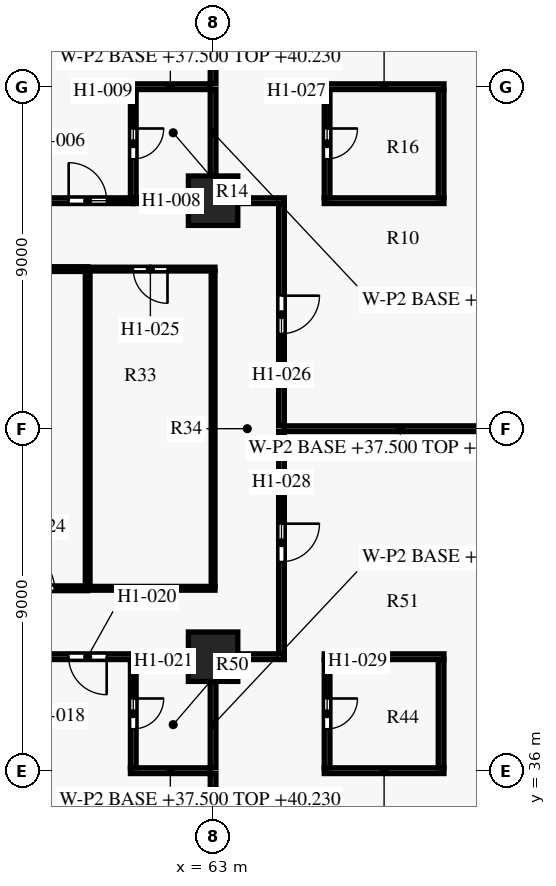
"""IFC4 building model, lengths in metres.
Left out: names, types, materials, properties, quantities, classifications, styles, units other than length and angle.
Written with IfcOpenShell. Run it as: python <this file> out.ifc"""

import sys

from ifc_helpers import new_model, si_unit, direction, frame, frame_2d, origin, origin_2d, place, context, subcontext, project, spatial, rectangle, extrude, element, fill, save


model = new_model("IFC4")
c1 = context("Model", 3, precision=1e-05, world=origin(), true_north=direction((0.0, 1.0)))
c2 = subcontext(c1, "Body", "Model", "MODEL_VIEW")
j1 = project(units=[si_unit("LENGTHUNIT", "METRE"), si_unit("PLANEANGLEUNIT", "RADIAN")], contexts=[c1])
p1 = place(None, origin())
s1 = spatial("IfcSite", under=j1, at=p1, CompositionType="ELEMENT")
p2 = place(p1, origin())
s2 = spatial("IfcBuilding", under=s1, at=p2, CompositionType="ELEMENT")
p3 = place(p2, frame((0.0, 0.0, 37.5)))
s3 = spatial("IfcBuildingStorey", under=s2, at=p3, CompositionType="ELEMENT", Elevation=37.5)
for number, where, z_axis, x_axis in (
    (1, (63.0, 39.0, 0.0), (0.0, 0.0, 1.0), (1.0, 0.0, 0.0)),
    (2, (63.0, 51.0, 0.0), (0.0, 0.0, 1.0), (1.0, 0.0, 0.0)),
):
    element("IfcColumn", number, at=place(p3, frame(where, z_axis=z_axis, x_axis=x_axis)), inside=s3, PredefinedType="COLUMN", context=c2, shape_type="SweptSolid", body=[
        extrude(rectangle(XDim=1.3, YDim=1.3, at=origin_2d()), origin(), (0.0, 0.0, 1.0), 3.6),
    ])
p4 = place(p3, frame((63.0, 35.925, 0.0), z_axis=(0.0, 0.0, 1.0), x_axis=(0.0, -1.0, 0.0)))
e3 = element("IfcWall", 3, at=p4, inside=s3, PredefinedType="PARTITIONING", context=c2, shape_type="SweptSolid", body=[
    extrude(rectangle(XDim=8.8, YDim=0.15, at=frame_2d((4.4, 0.0))), origin(), (0.0, 0.0, 1.0), 2.73),
])
p5 = place(p3, frame((60.825, 36.0, 0.0), z_axis=(0.0, 0.0, 1.0), x_axis=(1.0, 0.0, 0.0)))
e4 = element("IfcWall", 4, at=p5, inside=s3, PredefinedType="PARTITIONING", context=c2, shape_type="SweptSolid", body=[
    extrude(rectangle(XDim=2.1, YDim=0.15, at=frame_2d((1.05, 0.0))), origin(), (0.0, 0.0, 1.0), 2.73),
])
p6 = place(p3, frame((65.925, 36.0, 0.0), z_axis=(0.0, 0.0, 1.0), x_axis=(1.0, 0.0, 0.0)))
e5 = element("IfcWall", 5, at=p6, inside=s3, PredefinedType="PARTITIONING", context=c2, shape_type="SweptSolid", body=[
    extrude(rectangle(XDim=3.15, YDim=0.15, at=frame_2d((1.575, 0.0))), origin(), (0.0, 0.0, 1.0), 3.28),
])
p7 = place(p3, frame((69.0, 36.075, 0.0), z_axis=(0.0, 0.0, 1.0), x_axis=(0.0, 1.0, 0.0)))
e6 = element("IfcWall", 6, at=p7, inside=s3, PredefinedType="PARTITIONING", context=c2, shape_type="SweptSolid", body=[
    extrude(rectangle(XDim=2.85, YDim=0.15, at=frame_2d((1.425, 0.0))), origin(), (0.0, 0.0, 1.0), 2.58),
])
p8 = place(p3, frame((63.0, 38.345, 0.0), z_axis=(0.0, 0.0, 1.0), x_axis=(0.0, -1.0, 0.0)))
e7 = element("IfcWall", 7, at=p8, inside=s3, PredefinedType="PARTITIONING", context=c2, shape_type="SweptSolid", body=[
    extrude(rectangle(XDim=2.27, YDim=0.15, at=frame_2d((1.135, 0.0))), origin(), (0.0, 0.0, 1.0), 2.73),
])
p9 = place(p3, frame((60.9, 38.925, 0.0), z_axis=(0.0, 0.0, 1.0), x_axis=(0.0, -1.0, 0.0)))
e8 = element("IfcWall", 8, at=p9, inside=s3, PredefinedType="PARTITIONING", context=c2, shape_type="SweptSolid", body=[
    extrude(rectangle(XDim=2.85, YDim=0.15, at=frame_2d((1.425, 0.0))), origin(), (0.0, 0.0, 1.0), 2.58),
])
p10 = place(p9, frame((1.025, 0.0, 0.0)))
e9 = element("IfcOpeningElement", 9, at=p10, cuts=e8, PredefinedType="OPENING", context=c2, shape_type="SweptSolid", body=[
    extrude(rectangle(XDim=0.8, YDim=2.1, at=frame_2d((0.4, 1.05))), frame((0.0, 0.085, 0.0), z_axis=(0.0, -1.0, 0.0), x_axis=(1.0, 0.0, 0.0)), (0.0, 0.0, 1.0), 0.17),
])
p11 = place(p3, frame((66.0, 38.925, 0.0), z_axis=(0.0, 0.0, 1.0), x_axis=(0.0, -1.0, 0.0)))
e10 = element("IfcWall", 10, at=p11, inside=s3, PredefinedType="PARTITIONING", context=c2, shape_type="SweptSolid", body=[
    extrude(rectangle(XDim=2.85, YDim=0.15, at=frame_2d((1.425, 0.0))), origin(), (0.0, 0.0, 1.0), 2.58),
])
p12 = place(p11, frame((1.025, 0.0, 0.0)))
e11 = element("IfcOpeningElement", 11, at=p12, cuts=e10, PredefinedType="OPENING", context=c2, shape_type="SweptSolid", body=[
    extrude(rectangle(XDim=0.8, YDim=2.1, at=frame_2d((0.4, 1.05))), frame((0.0, 0.085, 0.0), z_axis=(0.0, -1.0, 0.0), x_axis=(1.0, 0.0, 0.0)), (0.0, 0.0, 1.0), 0.17),
])
p13 = place(p3, frame((60.9, 39.0, 0.0), z_axis=(0.0, 0.0, 1.0), x_axis=(-1.0, 0.0, 0.0)))
e12 = element("IfcWall", 12, at=p13, inside=s3, PredefinedType="PARTITIONING", context=c2, shape_type="SweptSolid", body=[
    extrude(rectangle(XDim=2.4, YDim=0.15, at=frame_2d((1.2, 0.0))), origin(), (0.0, 0.0, 1.0), 2.58),
])
p14 = place(p13, frame((0.7, 0.0, 0.0)))
e13 = element("IfcOpeningElement", 13, at=p14, cuts=e12, PredefinedType="OPENING", context=c2, shape_type="SweptSolid", body=[
    extrude(rectangle(XDim=1.0, YDim=2.1, at=frame_2d((0.5, 1.05))), frame((0.0, 0.085, 0.0), z_axis=(0.0, -1.0, 0.0), x_axis=(1.0, 0.0, 0.0)), (0.0, 0.0, 1.0), 0.17),
])
p15 = place(p3, frame((62.345, 39.0, 0.0), z_axis=(0.0, 0.0, 1.0), x_axis=(-1.0, 0.0, 0.0)))
e14 = element("IfcWall", 14, at=p15, inside=s3, PredefinedType="PARTITIONING", context=c2, shape_type="SweptSolid", body=[
    extrude(rectangle(XDim=1.445, YDim=0.15, at=frame_2d((0.723, 0.0))), origin(), (0.0, 0.0, 1.0), 2.58),
])
p16 = place(p3, frame((64.875, 39.0, 0.0), z_axis=(0.0, 0.0, 1.0), x_axis=(-1.0, 0.0, 0.0)))
e15 = element("IfcWall", 15, at=p16, inside=s3, PredefinedType="PARTITIONING", context=c2, shape_type="SweptSolid", body=[
    extrude(rectangle(XDim=1.22, YDim=0.15, at=frame_2d((0.61, 0.0))), origin(), (0.0, 0.0, 1.0), 2.58),
])
p17 = place(p3, frame((69.075, 39.0, 0.0), z_axis=(0.0, 0.0, 1.0), x_axis=(-1.0, 0.0, 0.0)))
e16 = element("IfcWall", 16, at=p17, inside=s3, PredefinedType="PARTITIONING", context=c2, shape_type="SweptSolid", body=[
    extrude(rectangle(XDim=3.15, YDim=0.15, at=frame_2d((1.575, 0.0))), origin(), (0.0, 0.0, 1.0), 2.58),
])
p18 = place(p3, frame((57.0, 40.8, 0.0), z_axis=(0.0, 0.0, 1.0), x_axis=(1.0, 0.0, 0.0)))
e17 = element("IfcWall", 17, at=p18, inside=s3, PredefinedType="PARTITIONING", context=c2, shape_type="SweptSolid", body=[
    extrude(rectangle(XDim=2.7, YDim=0.125, at=frame_2d((1.35, 0.0))), origin(), (0.0, 0.0, 1.0), 3.28),
])
p19 = place(p18, frame((0.875, 0.0, 0.0)))
e18 = element("IfcOpeningElement", 18, at=p19, cuts=e17, PredefinedType="OPENING", context=c2, shape_type="SweptSolid", body=[
    extrude(rectangle(XDim=0.95, YDim=2.1, at=frame_2d((0.475, 1.05))), frame((0.0, 0.073, 0.0), z_axis=(0.0, -1.0, 0.0), x_axis=(1.0, 0.0, 0.0)), (0.0, 0.0, 1.0), 0.145),
])
p20 = place(p3, frame((59.7, 40.8, 0.0), z_axis=(0.0, 0.0, 1.0), x_axis=(1.0, 0.0, 0.0)))
e19 = element("IfcWall", 19, at=p20, inside=s3, PredefinedType="PARTITIONING", context=c2, shape_type="SweptSolid", body=[
    extrude(rectangle(XDim=3.35, YDim=0.1, at=frame_2d((1.675, 0.0))), origin(), (0.0, 0.0, 1.0), 2.73),
])
p21 = place(p3, frame((63.0, 40.85, 0.0), z_axis=(0.0, 0.0, 1.0), x_axis=(0.0, 1.0, 0.0)))
e20 = element("IfcWall", 20, at=p21, inside=s3, PredefinedType="PARTITIONING", context=c2, shape_type="SweptSolid", body=[
    extrude(rectangle(XDim=8.3, YDim=0.1, at=frame_2d((4.15, 0.0))), origin(), (0.0, 0.0, 1.0), 2.73),
])
p22 = place(p3, frame((64.8, 44.925, 0.0), z_axis=(0.0, 0.0, 1.0), x_axis=(0.0, -1.0, 0.0)))
e21 = element("IfcWall", 21, at=p22, inside=s3, PredefinedType="PARTITIONING", context=c2, shape_type="SweptSolid", body=[
    extrude(rectangle(XDim=5.85, YDim=0.15, at=frame_2d((2.925, 0.0))), origin(), (0.0, 0.0, 1.0), 2.58),
])
p23 = place(p22, frame((2.425, 0.0, 0.0)))
e22 = element("IfcOpeningElement", 22, at=p23, cuts=e21, PredefinedType="OPENING", context=c2, shape_type="SweptSolid", body=[
    extrude(rectangle(XDim=1.0, YDim=2.1, at=frame_2d((0.5, 1.05))), frame((0.0, 0.085, 0.0), z_axis=(0.0, -1.0, 0.0), x_axis=(1.0, 0.0, 0.0)), (0.0, 0.0, 1.0), 0.17),
])
p24 = place(p3, frame((70.98, 45.0, 0.0), z_axis=(0.0, 0.0, 1.0), x_axis=(-1.0, 0.0, 0.0)))
e23 = element("IfcWall", 23, at=p24, inside=s3, PredefinedType="PARTITIONING", context=c2, shape_type="SweptSolid", body=[
    extrude(rectangle(XDim=6.105, YDim=0.15, at=frame_2d((3.052, 0.0))), origin(), (0.0, 0.0, 1.0), 3.28),
])
p25 = place(p3, frame((59.7, 49.137, 0.0), z_axis=(0.0, 0.0, 1.0), x_axis=(0.0, -1.0, 0.0)))
e24 = element("IfcWall", 24, at=p25, inside=s3, PredefinedType="PARTITIONING", context=c2, shape_type="SweptSolid", body=[
    extrude(rectangle(XDim=8.275, YDim=0.125, at=frame_2d((4.137, 0.0))), origin(), (0.0, 0.0, 1.0), 3.28),
])
p26 = place(p3, frame((59.7, 49.2, 0.0), z_axis=(0.0, 0.0, 1.0), x_axis=(-1.0, 0.0, 0.0)))
e25 = element("IfcWall", 25, at=p26, inside=s3, PredefinedType="PARTITIONING", context=c2, shape_type="SweptSolid", body=[
    extrude(rectangle(XDim=2.7, YDim=0.125, at=frame_2d((1.35, 0.0))), origin(), (0.0, 0.0, 1.0), 3.28),
])
p27 = place(p3, frame((63.05, 49.2, 0.0), z_axis=(0.0, 0.0, 1.0), x_axis=(-1.0, 0.0, 0.0)))
e26 = element("IfcWall", 26, at=p27, inside=s3, PredefinedType="PARTITIONING", context=c2, shape_type="SweptSolid", body=[
    extrude(rectangle(XDim=3.35, YDim=0.1, at=frame_2d((1.675, 0.0))), origin(), (0.0, 0.0, 1.0), 2.73),
])
p28 = place(p27, frame((1.25, 0.0, 0.0)))
e27 = element("IfcOpeningElement", 27, at=p28, cuts=e26, PredefinedType="OPENING", context=c2, shape_type="SweptSolid", body=[
    extrude(rectangle(XDim=0.9, YDim=2.1, at=frame_2d((0.45, 1.05))), frame((0.0, 0.06, 0.0), z_axis=(0.0, -1.0, 0.0), x_axis=(1.0, 0.0, 0.0)), (0.0, 0.0, 1.0), 0.12),
])
p29 = place(p3, frame((64.8, 50.925, 0.0), z_axis=(0.0, 0.0, 1.0), x_axis=(0.0, -1.0, 0.0)))
e28 = element("IfcWall", 28, at=p29, inside=s3, PredefinedType="PARTITIONING", context=c2, shape_type="SweptSolid", body=[
    extrude(rectangle(XDim=5.85, YDim=0.15, at=frame_2d((2.925, 0.0))), origin(), (0.0, 0.0, 1.0), 2.58),
])
p30 = place(p29, frame((2.425, 0.0, 0.0)))
e29 = element("IfcOpeningElement", 29, at=p30, cuts=e28, PredefinedType="OPENING", context=c2, shape_type="SweptSolid", body=[
    extrude(rectangle(XDim=1.0, YDim=2.1, at=frame_2d((0.5, 1.05))), frame((0.0, 0.085, 0.0), z_axis=(0.0, -1.0, 0.0), x_axis=(1.0, 0.0, 0.0)), (0.0, 0.0, 1.0), 0.17),
])
p31 = place(p3, frame((58.5, 51.0, 0.0), z_axis=(0.0, 0.0, 1.0), x_axis=(1.0, 0.0, 0.0)))
e30 = element("IfcWall", 30, at=p31, inside=s3, PredefinedType="PARTITIONING", context=c2, shape_type="SweptSolid", body=[
    extrude(rectangle(XDim=2.4, YDim=0.15, at=frame_2d((1.2, 0.0))), origin(), (0.0, 0.0, 1.0), 2.58),
])
p32 = place(p31, frame((0.7, 0.0, 0.0)))
e31 = element("IfcOpeningElement", 31, at=p32, cuts=e30, PredefinedType="OPENING", context=c2, shape_type="SweptSolid", body=[
    extrude(rectangle(XDim=1.0, YDim=2.1, at=frame_2d((0.5, 1.05))), frame((0.0, 0.085, 0.0), z_axis=(0.0, -1.0, 0.0), x_axis=(1.0, 0.0, 0.0)), (0.0, 0.0, 1.0), 0.17),
])
p33 = place(p3, frame((60.9, 51.0, 0.0), z_axis=(0.0, 0.0, 1.0), x_axis=(1.0, 0.0, 0.0)))
e32 = element("IfcWall", 32, at=p33, inside=s3, PredefinedType="PARTITIONING", context=c2, shape_type="SweptSolid", body=[
    extrude(rectangle(XDim=1.445, YDim=0.15, at=frame_2d((0.723, 0.0))), origin(), (0.0, 0.0, 1.0), 2.58),
])
p34 = place(p3, frame((63.655, 51.0, 0.0), z_axis=(0.0, 0.0, 1.0), x_axis=(1.0, 0.0, 0.0)))
e33 = element("IfcWall", 33, at=p34, inside=s3, PredefinedType="PARTITIONING", context=c2, shape_type="SweptSolid", body=[
    extrude(rectangle(XDim=1.22, YDim=0.15, at=frame_2d((0.61, 0.0))), origin(), (0.0, 0.0, 1.0), 2.58),
])
p35 = place(p3, frame((65.925, 51.0, 0.0), z_axis=(0.0, 0.0, 1.0), x_axis=(1.0, 0.0, 0.0)))
e34 = element("IfcWall", 34, at=p35, inside=s3, PredefinedType="PARTITIONING", context=c2, shape_type="SweptSolid", body=[
    extrude(rectangle(XDim=3.15, YDim=0.15, at=frame_2d((1.575, 0.0))), origin(), (0.0, 0.0, 1.0), 2.58),
])
p36 = place(p3, frame((69.0, 51.075, 0.0), z_axis=(0.0, 0.0, 1.0), x_axis=(0.0, 1.0, 0.0)))
e35 = element("IfcWall", 35, at=p36, inside=s3, PredefinedType="PARTITIONING", context=c2, shape_type="SweptSolid", body=[
    extrude(rectangle(XDim=2.85, YDim=0.15, at=frame_2d((1.425, 0.0))), origin(), (0.0, 0.0, 1.0), 2.58),
])
p37 = place(p3, frame((60.9, 53.925, 0.0), z_axis=(0.0, 0.0, 1.0), x_axis=(0.0, -1.0, 0.0)))
e36 = element("IfcWall", 36, at=p37, inside=s3, PredefinedType="PARTITIONING", context=c2, shape_type="SweptSolid", body=[
    extrude(rectangle(XDim=2.85, YDim=0.15, at=frame_2d((1.425, 0.0))), origin(), (0.0, 0.0, 1.0), 2.58),
])
p38 = place(p37, frame((1.025, 0.0, 0.0)))
e37 = element("IfcOpeningElement", 37, at=p38, cuts=e36, PredefinedType="OPENING", context=c2, shape_type="SweptSolid", body=[
    extrude(rectangle(XDim=0.8, YDim=2.1, at=frame_2d((0.4, 1.05))), frame((0.0, 0.085, 0.0), z_axis=(0.0, -1.0, 0.0), x_axis=(1.0, 0.0, 0.0)), (0.0, 0.0, 1.0), 0.17),
])
p39 = place(p3, frame((63.0, 53.925, 0.0), z_axis=(0.0, 0.0, 1.0), x_axis=(0.0, -1.0, 0.0)))
e38 = element("IfcWall", 38, at=p39, inside=s3, PredefinedType="PARTITIONING", context=c2, shape_type="SweptSolid", body=[
    extrude(rectangle(XDim=2.27, YDim=0.15, at=frame_2d((1.135, 0.0))), origin(), (0.0, 0.0, 1.0), 2.73),
])
p40 = place(p3, frame((66.0, 53.925, 0.0), z_axis=(0.0, 0.0, 1.0), x_axis=(0.0, -1.0, 0.0)))
e39 = element("IfcWall", 39, at=p40, inside=s3, PredefinedType="PARTITIONING", context=c2, shape_type="SweptSolid", body=[
    extrude(rectangle(XDim=2.85, YDim=0.15, at=frame_2d((1.425, 0.0))), origin(), (0.0, 0.0, 1.0), 2.58),
])
p41 = place(p40, frame((1.025, 0.0, 0.0)))
e40 = element("IfcOpeningElement", 40, at=p41, cuts=e39, PredefinedType="OPENING", context=c2, shape_type="SweptSolid", body=[
    extrude(rectangle(XDim=0.8, YDim=2.1, at=frame_2d((0.4, 1.05))), frame((0.0, 0.085, 0.0), z_axis=(0.0, -1.0, 0.0), x_axis=(1.0, 0.0, 0.0)), (0.0, 0.0, 1.0), 0.17),
])
p42 = place(p3, frame((62.925, 54.0, 0.0), z_axis=(0.0, 0.0, 1.0), x_axis=(-1.0, 0.0, 0.0)))
e41 = element("IfcWall", 41, at=p42, inside=s3, PredefinedType="PARTITIONING", context=c2, shape_type="SweptSolid", body=[
    extrude(rectangle(XDim=2.1, YDim=0.15, at=frame_2d((1.05, 0.0))), origin(), (0.0, 0.0, 1.0), 2.73),
])
p43 = place(p3, frame((69.075, 54.0, 0.0), z_axis=(0.0, 0.0, 1.0), x_axis=(-1.0, 0.0, 0.0)))
e42 = element("IfcWall", 42, at=p43, inside=s3, PredefinedType="PARTITIONING", context=c2, shape_type="SweptSolid", body=[
    extrude(rectangle(XDim=3.15, YDim=0.15, at=frame_2d((1.575, 0.0))), origin(), (0.0, 0.0, 1.0), 3.28),
])
p44 = place(p3, frame((63.0, 62.875, 0.0), z_axis=(0.0, 0.0, 1.0), x_axis=(0.0, -1.0, 0.0)))
e43 = element("IfcWall", 43, at=p44, inside=s3, PredefinedType="PARTITIONING", context=c2, shape_type="SweptSolid", body=[
    extrude(rectangle(XDim=8.8, YDim=0.15, at=frame_2d((4.4, 0.0))), origin(), (0.0, 0.0, 1.0), 2.73),
])
p45 = place(p32, origin())
e44 = element("IfcDoor", 44, at=p45, inside=s3, OperationType="SINGLE_SWING_LEFT", PredefinedType="DOOR", context=c2, shape_type="SweptSolid", body=[
    extrude(rectangle(XDim=1.0, YDim=2.1, at=frame_2d((0.5, 1.05))), frame((0.0, 0.025, 0.0), z_axis=(0.0, -1.0, 0.0), x_axis=(1.0, 0.0, 0.0)), (0.0, 0.0, 1.0), 0.05),
])
fill(e31, e44)
p46 = place(p38, origin())
e45 = element("IfcDoor", 45, at=p46, inside=s3, OperationType="SINGLE_SWING_LEFT", PredefinedType="DOOR", context=c2, shape_type="SweptSolid", body=[
    extrude(rectangle(XDim=0.8, YDim=2.1, at=frame_2d((0.4, 1.05))), frame((0.0, 0.025, 0.0), z_axis=(0.0, -1.0, 0.0), x_axis=(1.0, 0.0, 0.0)), (0.0, 0.0, 1.0), 0.05),
])
fill(e37, e45)
p47 = place(p14, origin())
e46 = element("IfcDoor", 46, at=p47, inside=s3, OperationType="SINGLE_SWING_LEFT", PredefinedType="DOOR", context=c2, shape_type="SweptSolid", body=[
    extrude(rectangle(XDim=1.0, YDim=2.1, at=frame_2d((0.5, 1.05))), frame((0.0, 0.025, 0.0), z_axis=(0.0, -1.0, 0.0), x_axis=(1.0, 0.0, 0.0)), (0.0, 0.0, 1.0), 0.05),
])
fill(e13, e46)
p48 = place(p10, origin())
e47 = element("IfcDoor", 47, at=p48, inside=s3, OperationType="SINGLE_SWING_LEFT", PredefinedType="DOOR", context=c2, shape_type="SweptSolid", body=[
    extrude(rectangle(XDim=0.8, YDim=2.1, at=frame_2d((0.4, 1.05))), frame((0.0, 0.025, 0.0), z_axis=(0.0, -1.0, 0.0), x_axis=(1.0, 0.0, 0.0)), (0.0, 0.0, 1.0), 0.05),
])
fill(e9, e47)
p49 = place(p19, origin())
e48 = element("IfcDoor", 48, at=p49, inside=s3, OperationType="SINGLE_SWING_LEFT", PredefinedType="DOOR", context=c2, shape_type="SweptSolid", body=[
    extrude(rectangle(XDim=0.95, YDim=2.1, at=frame_2d((0.475, 1.05))), frame((0.0, 0.025, 0.0), z_axis=(0.0, -1.0, 0.0), x_axis=(1.0, 0.0, 0.0)), (0.0, 0.0, 1.0), 0.05),
])
fill(e18, e48)
p50 = place(p28, origin())
e49 = element("IfcDoor", 49, at=p50, inside=s3, OperationType="SINGLE_SWING_LEFT", PredefinedType="DOOR", context=c2, shape_type="SweptSolid", body=[
    extrude(rectangle(XDim=0.9, YDim=2.1, at=frame_2d((0.45, 1.05))), frame((0.0, 0.025, 0.0), z_axis=(0.0, -1.0, 0.0), x_axis=(1.0, 0.0, 0.0)), (0.0, 0.0, 1.0), 0.05),
])
fill(e27, e49)
p51 = place(p30, origin())
e50 = element("IfcDoor", 50, at=p51, inside=s3, OperationType="SINGLE_SWING_LEFT", PredefinedType="DOOR", context=c2, shape_type="SweptSolid", body=[
    extrude(rectangle(XDim=1.0, YDim=2.1, at=frame_2d((0.5, 1.05))), frame((0.0, 0.025, 0.0), z_axis=(0.0, -1.0, 0.0), x_axis=(1.0, 0.0, 0.0)), (0.0, 0.0, 1.0), 0.05),
])
fill(e29, e50)
p52 = place(p41, origin())
e51 = element("IfcDoor", 51, at=p52, inside=s3, OperationType="SINGLE_SWING_RIGHT", PredefinedType="DOOR", context=c2, shape_type="SweptSolid", body=[
    extrude(rectangle(XDim=0.8, YDim=2.1, at=frame_2d((0.4, 1.05))), frame((0.0, 0.025, 0.0), z_axis=(0.0, -1.0, 0.0), x_axis=(1.0, 0.0, 0.0)), (0.0, 0.0, 1.0), 0.05),
])
fill(e40, e51)
p53 = place(p23, origin())
e52 = element("IfcDoor", 52, at=p53, inside=s3, OperationType="SINGLE_SWING_LEFT", PredefinedType="DOOR", context=c2, shape_type="SweptSolid", body=[
    extrude(rectangle(XDim=1.0, YDim=2.1, at=frame_2d((0.5, 1.05))), frame((0.0, 0.025, 0.0), z_axis=(0.0, -1.0, 0.0), x_axis=(1.0, 0.0, 0.0)), (0.0, 0.0, 1.0), 0.05),
])
fill(e22, e52)
p54 = place(p12, origin())
e53 = element("IfcDoor", 53, at=p54, inside=s3, OperationType="SINGLE_SWING_RIGHT", PredefinedType="DOOR", context=c2, shape_type="SweptSolid", body=[
    extrude(rectangle(XDim=0.8, YDim=2.1, at=frame_2d((0.4, 1.05))), frame((0.0, 0.025, 0.0), z_axis=(0.0, -1.0, 0.0), x_axis=(1.0, 0.0, 0.0)), (0.0, 0.0, 1.0), 0.05),
])
fill(e11, e53)
save(model, sys.argv[1])
